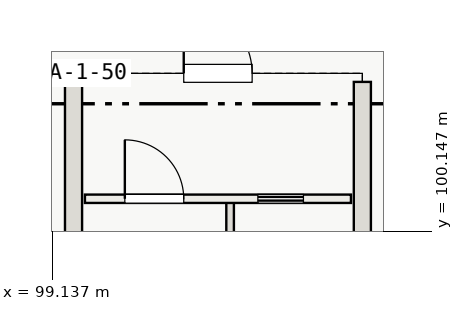
"""IFC4 building model, lengths in metres.
Left out: names, types, materials, properties, quantities, classifications, styles, units other than length and angle.
Written with IfcOpenShell. Run it as: python <this file> out.ifc"""

import sys

from ifc_helpers import new_model, si_unit, direction, frame, frame_2d, origin, place, context, subcontext, project, spatial, rectangle, extrude, element, fill, save


model = new_model("IFC4")
c1 = context("Model", 3, precision=1e-05, world=origin(), true_north=direction((0.0, 1.0)))
c2 = subcontext(c1, "Body", "Model", "MODEL_VIEW")
j1 = project(units=[si_unit("LENGTHUNIT", "METRE"), si_unit("PLANEANGLEUNIT", "RADIAN")], contexts=[c1])
p1 = place(None, origin())
s1 = spatial("IfcSite", under=j1, at=p1, CompositionType="ELEMENT")
p2 = place(p1, origin())
s2 = spatial("IfcBuilding", under=s1, at=p2, CompositionType="ELEMENT")
p3 = place(p2, frame((0.0, 0.0, 21.6)))
s3 = spatial("IfcBuildingStorey", under=s2, at=p3, CompositionType="ELEMENT", Elevation=21.6)
p4 = place(p3, frame((99.475, 104.3, 0.0), z_axis=(0.0, 0.0, 1.0), x_axis=(1.0, 0.0, 0.0)))
e1 = element("IfcWall", 1, at=p4, inside=s3, PredefinedType="SHEAR", context=c2, shape_type="SweptSolid", body=[
    extrude(rectangle(XDim=8.05, YDim=0.45, at=frame_2d((4.025, 0.0))), origin(), (0.0, 0.0, 1.0), 4.8),
])
p5 = place(p4, frame((3.125, 0.0, 0.0)))
e2 = element("IfcOpeningElement", 2, at=p5, cuts=e1, PredefinedType="OPENING", context=c2, shape_type="SweptSolid", body=[
    extrude(rectangle(XDim=1.8, YDim=2.3, at=frame_2d((0.9, 1.15))), frame((0.0, 0.235, 0.0), z_axis=(0.0, -1.0, 0.0), x_axis=(1.0, 0.0, 0.0)), (0.0, 0.0, 1.0), 0.47),
])
for number, where, z_axis, x_axis in (
    (3, (99.7, 92.925, 0.0), (0.0, 0.0, 1.0), (0.0, 1.0, 0.0)),
    (4, (107.3, 92.925, 0.0), (0.0, 0.0, 1.0), (0.0, 1.0, 0.0)),
):
    element("IfcWall", number, at=place(p3, frame(where, z_axis=z_axis, x_axis=x_axis)), inside=s3, PredefinedType="SHEAR", context=c2, shape_type="SweptSolid", body=[
        extrude(rectangle(XDim=11.15, YDim=0.45, at=frame_2d((5.575, 0.0))), origin(), (0.0, 0.0, 1.0), 4.8),
    ])
p6 = place(p3, frame((103.82, 92.95, 0.0), z_axis=(0.0, 0.0, 1.0), x_axis=(0.0, 1.0, 0.0)))
e5 = element("IfcWall", 5, at=p6, inside=s3, PredefinedType="SOLIDWALL", context=c2, shape_type="SweptSolid", body=[
    extrude(rectangle(XDim=8.0, YDim=0.2, at=frame_2d((4.0, 0.0))), origin(), (0.0, 0.0, 1.0), 4.8),
])
p7 = place(p3, frame((100.0, 101.0, 0.0), z_axis=(0.0, 0.0, 1.0), x_axis=(1.0, 0.0, 0.0)))
e6 = element("IfcWall", 6, at=p7, inside=s3, PredefinedType="SOLIDWALL", context=c2, shape_type="SweptSolid", body=[
    extrude(rectangle(XDim=7.0, YDim=0.22, at=frame_2d((3.5, 0.0))), origin(), (0.0, 0.0, 1.0), 4.53),
])
p8 = place(p7, frame((1.05, 0.0, 0.0)))
e7 = element("IfcOpeningElement", 7, at=p8, cuts=e6, PredefinedType="OPENING", context=c2, shape_type="SweptSolid", body=[
    extrude(rectangle(XDim=1.55, YDim=2.2, at=frame_2d((0.775, 1.1))), frame((0.0, 0.12, 0.0), z_axis=(0.0, -1.0, 0.0), x_axis=(1.0, 0.0, 0.0)), (0.0, 0.0, 1.0), 0.24),
])
p9 = place(p7, frame((4.55, 0.0, 0.0)))
e8 = element("IfcOpeningElement", 8, at=p9, cuts=e6, PredefinedType="OPENING", context=c2, shape_type="SweptSolid", body=[
    extrude(rectangle(XDim=1.2, YDim=2.2, at=frame_2d((0.6, 1.1))), frame((0.0, 0.12, 0.0), z_axis=(0.0, -1.0, 0.0), x_axis=(1.0, 0.0, 0.0)), (0.0, 0.0, 1.0), 0.24),
])
p10 = place(p8, origin())
e9 = element("IfcDoor", 9, at=p10, inside=s3, OperationType="SINGLE_SWING_LEFT", PredefinedType="DOOR", context=c2, shape_type="SweptSolid", body=[
    extrude(rectangle(XDim=1.55, YDim=2.2, at=frame_2d((0.775, 1.1))), frame((0.0, 0.025, 0.0), z_axis=(0.0, -1.0, 0.0), x_axis=(1.0, 0.0, 0.0)), (0.0, 0.0, 1.0), 0.05),
])
fill(e7, e9)
p11 = place(p9, origin())
e10 = element("IfcDoor", 10, at=p11, inside=s3, OperationType="SLIDING_TO_LEFT", PredefinedType="DOOR", context=c2, shape_type="SweptSolid", body=[
    extrude(rectangle(XDim=1.2, YDim=2.2, at=frame_2d((0.6, 1.1))), frame((0.0, 0.025, 0.0), z_axis=(0.0, -1.0, 0.0), x_axis=(1.0, 0.0, 0.0)), (0.0, 0.0, 1.0), 0.05),
])
fill(e8, e10)
p12 = place(p5, frame((1.8, 0.0, 0.0), z_axis=(0.0, 0.0, 1.0), x_axis=(-1.0, 0.0, 0.0)))
e11 = element("IfcDoor", 11, at=p12, inside=s3, OperationType="DOUBLE_DOOR_SINGLE_SWING", PredefinedType="DOOR", context=c2, shape_type="SweptSolid", body=[
    extrude(rectangle(XDim=1.8, YDim=2.3, at=frame_2d((0.9, 1.15))), frame((0.0, 0.025, 0.0), z_axis=(0.0, -1.0, 0.0), x_axis=(1.0, 0.0, 0.0)), (0.0, 0.0, 1.0), 0.05),
])
fill(e2, e11)
save(model, sys.argv[1])
